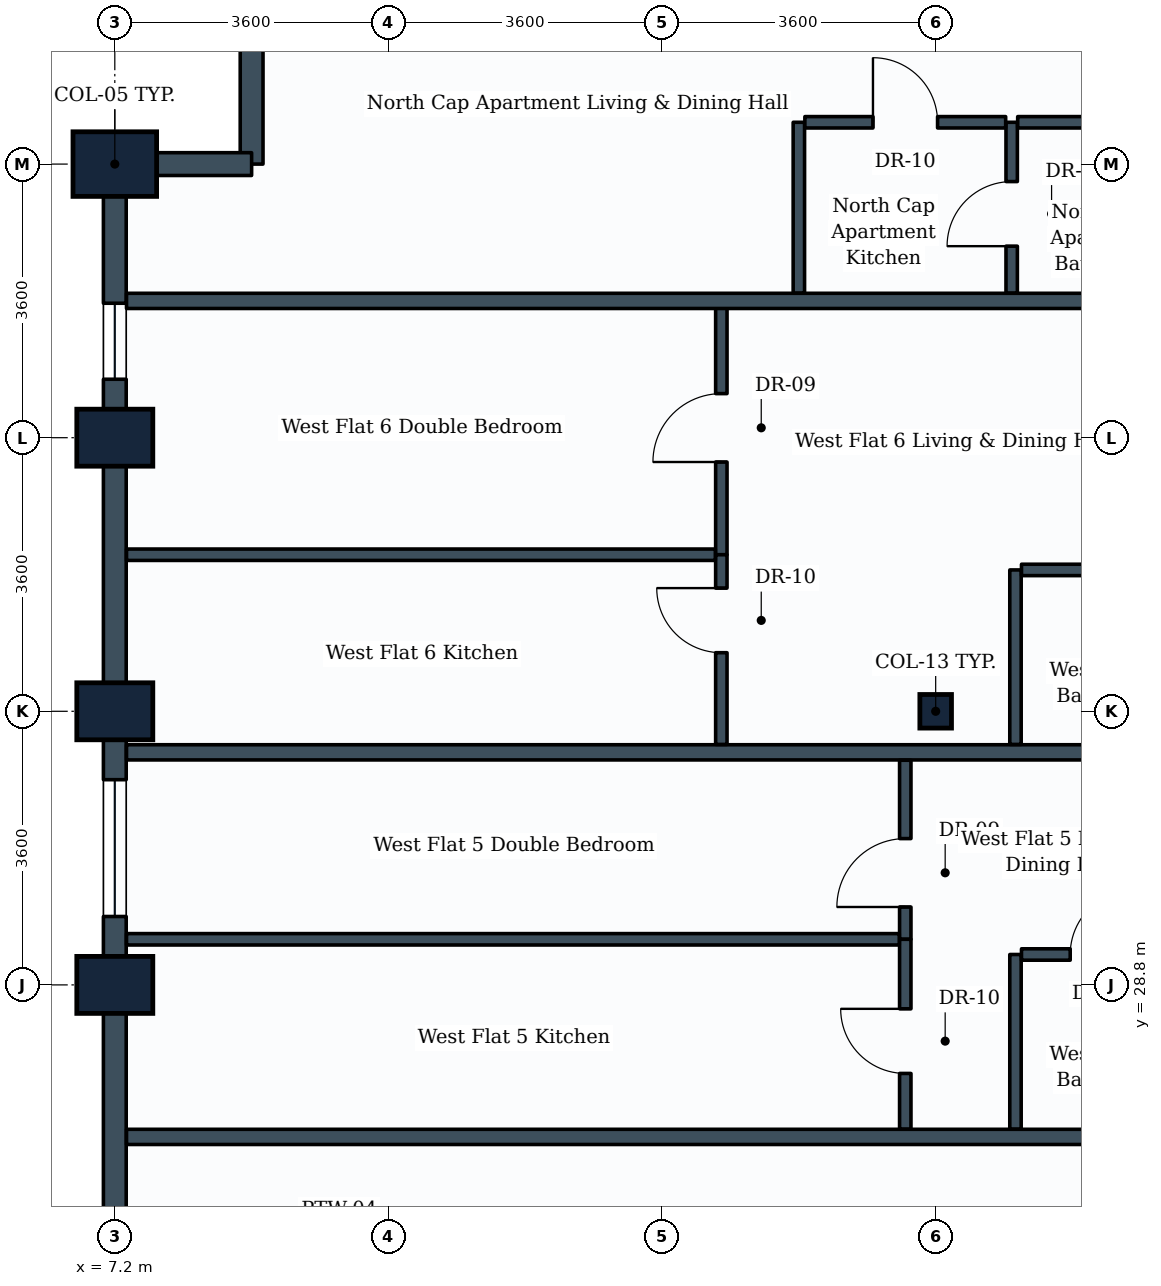
"""IFC4 building model, lengths in metres.
Left out: names, types, materials, properties, quantities, classifications, styles, units other than length and angle.
Written with IfcOpenShell. Run it as: python <this file> out.ifc"""

import sys

from ifc_helpers import new_model, si_unit, direction, frame, frame_2d, origin, origin_2d, place, context, subcontext, project, spatial, rectangle, i_section, extrude, element, fill, save


model = new_model("IFC4")
c1 = context("Model", 3, precision=1e-05, world=origin(), true_north=direction((0.0, 1.0)))
c2 = subcontext(c1, "Body", "Model", "MODEL_VIEW")
j1 = project(units=[si_unit("LENGTHUNIT", "METRE"), si_unit("PLANEANGLEUNIT", "RADIAN")], contexts=[c1])
p1 = place(None, origin())
s1 = spatial("IfcSite", under=j1, at=p1, CompositionType="ELEMENT")
p2 = place(p1, origin())
s2 = spatial("IfcBuilding", under=s1, at=p2, CompositionType="ELEMENT")
p3 = place(p2, frame((0.0, 0.0, 165.6)))
s3 = spatial("IfcBuildingStorey", under=s2, at=p3, CompositionType="ELEMENT", Elevation=165.6)
for number, where, z_axis, x_axis in (
    (1, (7.2, 28.8, 0.0), (0.0, 0.0, 1.0), (0.0, 1.0, 0.0)),
    (2, (7.2, 32.4, 0.0), (0.0, 0.0, 1.0), (0.0, 1.0, 0.0)),
    (3, (7.2, 36.0, 0.0), (0.0, 0.0, 1.0), (0.0, 1.0, 0.0)),
):
    element("IfcColumn", number, at=place(p3, frame(where, z_axis=z_axis, x_axis=x_axis)), inside=s3, PredefinedType="COLUMN", context=c2, shape_type="SweptSolid", body=[
        extrude(rectangle(XDim=0.75, YDim=1.0, at=origin_2d()), origin(), (0.0, 0.0, 1.0), 3.8),
    ])
p4 = place(p3, frame((7.2, 39.6, 0.0), z_axis=(0.0, 0.0, 1.0), x_axis=(0.0, 1.0, 0.0)))
e4 = element("IfcColumn", 4, at=p4, inside=s3, PredefinedType="COLUMN", context=c2, shape_type="SweptSolid", body=[
    extrude(rectangle(XDim=0.85, YDim=1.1, at=origin_2d()), origin(), (0.0, 0.0, 1.0), 3.8),
])
p5 = place(p3, frame((18.0, 32.4, 0.0), z_axis=(0.0, 0.0, 1.0), x_axis=(1.0, 0.0, 0.0)))
e5 = element("IfcColumn", 5, at=p5, inside=s3, PredefinedType="COLUMN", context=c2, shape_type="SweptSolid", body=[
    extrude(i_section(OverallWidth=0.416, OverallDepth=0.442, WebThickness=0.025, FlangeThickness=0.041, FilletRadius=0.015, at=origin_2d()), origin(), (0.0, 0.0, 1.0), 3.8),
])
p6 = place(p3, frame((9.0, 39.6, 0.0), z_axis=(0.0, 0.0, 1.0), x_axis=(0.0, 1.0, 0.0)))
e6 = element("IfcWall", 6, at=p6, inside=s3, PredefinedType="STANDARD", context=c2, shape_type="SweptSolid", body=[
    extrude(rectangle(XDim=1.8, YDim=0.3, at=frame_2d((0.9, 0.0))), origin(), (0.0, 0.0, 1.0), 3.465),
])
p7 = place(p3, frame((7.2, 39.6, 0.0), z_axis=(0.0, 0.0, 1.0), x_axis=(1.0, 0.0, 0.0)))
e7 = element("IfcWall", 7, at=p7, inside=s3, PredefinedType="STANDARD", context=c2, shape_type="SweptSolid", body=[
    extrude(rectangle(XDim=1.8, YDim=0.3, at=frame_2d((0.9, 0.0))), origin(), (0.0, 0.0, 1.0), 2.93),
])
p8 = place(p3, frame((7.2, 36.0, 0.0), z_axis=(0.0, 0.0, 1.0), x_axis=(0.0, 1.0, 0.0)))
e8 = element("IfcWall", 8, at=p8, inside=s3, PredefinedType="STANDARD", context=c2, shape_type="SweptSolid", body=[
    extrude(rectangle(XDim=3.6, YDim=0.3, at=frame_2d((1.8, 0.0))), origin(), (0.0, 0.0, 1.0), 2.93),
])
p9 = place(p8, frame((0.769, 0.0, 0.85)))
e9 = element("IfcOpeningElement", 9, at=p9, cuts=e8, PredefinedType="OPENING", context=c2, shape_type="SweptSolid", body=[
    extrude(rectangle(XDim=1.0, YDim=1.35, at=frame_2d((0.5, 0.675))), frame((0.0, 0.16, 0.0), z_axis=(0.0, -1.0, 0.0), x_axis=(1.0, 0.0, 0.0)), (0.0, 0.0, 1.0), 0.32),
])
p10 = place(p3, frame((7.2, 32.4, 0.0), z_axis=(0.0, 0.0, 1.0), x_axis=(0.0, 1.0, 0.0)))
e10 = element("IfcWall", 10, at=p10, inside=s3, PredefinedType="STANDARD", context=c2, shape_type="SweptSolid", body=[
    extrude(rectangle(XDim=3.6, YDim=0.3, at=frame_2d((1.8, 0.0))), origin(), (0.0, 0.0, 1.0), 2.93),
])
p11 = place(p3, frame((7.2, 28.8, 0.0), z_axis=(0.0, 0.0, 1.0), x_axis=(0.0, 1.0, 0.0)))
e11 = element("IfcWall", 11, at=p11, inside=s3, PredefinedType="STANDARD", context=c2, shape_type="SweptSolid", body=[
    extrude(rectangle(XDim=3.6, YDim=0.3, at=frame_2d((1.8, 0.0))), origin(), (0.0, 0.0, 1.0), 2.93),
])
p12 = place(p11, frame((0.9, 0.0, 0.85)))
e12 = element("IfcOpeningElement", 12, at=p12, cuts=e11, PredefinedType="OPENING", context=c2, shape_type="SweptSolid", body=[
    extrude(rectangle(XDim=1.8, YDim=1.35, at=frame_2d((0.9, 0.675))), frame((0.0, 0.16, 0.0), z_axis=(0.0, -1.0, 0.0), x_axis=(1.0, 0.0, 0.0)), (0.0, 0.0, 1.0), 0.32),
])
p13 = place(p3, frame((7.2, 25.2, 0.0), z_axis=(0.0, 0.0, 1.0), x_axis=(0.0, 1.0, 0.0)))
e13 = element("IfcWall", 13, at=p13, inside=s3, PredefinedType="STANDARD", context=c2, shape_type="SweptSolid", body=[
    extrude(rectangle(XDim=3.6, YDim=0.3, at=frame_2d((1.8, 0.0))), origin(), (0.0, 0.0, 1.0), 2.93),
])
for number, where, z_axis, x_axis in (
    (14, (7.354, 26.8, 0.0), (0.0, 0.0, 1.0), (1.0, 0.0, 0.0)),
    (15, (7.354, 31.86, 0.0), (0.0, 0.0, 1.0), (1.0, 0.0, 0.0)),
):
    element("IfcWall", number, at=place(p3, frame(where, z_axis=z_axis, x_axis=x_axis)), inside=s3, PredefinedType="PARTITIONING", context=c2, shape_type="SweptSolid", body=[
        extrude(rectangle(XDim=14.046, YDim=0.2, at=frame_2d((7.023, 0.0))), origin(), (0.0, 0.0, 1.0), 2.93),
    ])
p14 = place(p3, frame((19.05, 26.904, 0.0), z_axis=(0.0, 0.0, 1.0), x_axis=(0.0, 1.0, 0.0)))
e16 = element("IfcWall", 16, at=p14, inside=s3, PredefinedType="PARTITIONING", context=c2, shape_type="SweptSolid", body=[
    extrude(rectangle(XDim=2.296, YDim=0.15, at=frame_2d((1.148, 0.0))), origin(), (0.0, 0.0, 1.0), 3.1),
])
p15 = place(p3, frame((19.129, 29.2, 0.0), z_axis=(0.0, 0.0, 1.0), x_axis=(1.0, 0.0, 0.0)))
e17 = element("IfcWall", 17, at=p15, inside=s3, PredefinedType="PARTITIONING", context=c2, shape_type="SweptSolid", body=[
    extrude(rectangle(XDim=2.167, YDim=0.15, at=frame_2d((1.083, 0.0))), origin(), (0.0, 0.0, 1.0), 3.465),
])
p16 = place(p15, frame((0.641, 0.0, 0.0)))
e18 = element("IfcOpeningElement", 18, at=p16, cuts=e17, PredefinedType="OPENING", context=c2, shape_type="SweptSolid", body=[
    extrude(rectangle(XDim=0.85, YDim=2.1, at=frame_2d((0.425, 1.05))), frame((0.0, 0.085, 0.0), z_axis=(0.0, -1.0, 0.0), x_axis=(1.0, 0.0, 0.0)), (0.0, 0.0, 1.0), 0.17),
])
p17 = place(p3, frame((17.6, 29.4, 0.0), z_axis=(0.0, 0.0, 1.0), x_axis=(0.0, 1.0, 0.0)))
e19 = element("IfcWall", 19, at=p17, inside=s3, PredefinedType="PARTITIONING", context=c2, shape_type="SweptSolid", body=[
    extrude(rectangle(XDim=2.356, YDim=0.15, at=frame_2d((1.178, 0.0))), origin(), (0.0, 0.0, 1.0), 3.465),
])
p18 = place(p17, frame((0.425, 0.0, 0.0)))
e20 = element("IfcOpeningElement", 20, at=p18, cuts=e19, PredefinedType="OPENING", context=c2, shape_type="SweptSolid", body=[
    extrude(rectangle(XDim=0.9, YDim=2.1, at=frame_2d((0.45, 1.05))), frame((0.0, 0.085, 0.0), z_axis=(0.0, -1.0, 0.0), x_axis=(1.0, 0.0, 0.0)), (0.0, 0.0, 1.0), 0.17),
])
p19 = place(p3, frame((17.6, 26.904, 0.0), z_axis=(0.0, 0.0, 1.0), x_axis=(0.0, 1.0, 0.0)))
e21 = element("IfcWall", 21, at=p19, inside=s3, PredefinedType="PARTITIONING", context=c2, shape_type="SweptSolid", body=[
    extrude(rectangle(XDim=2.496, YDim=0.15, at=frame_2d((1.248, 0.0))), origin(), (0.0, 0.0, 1.0), 3.1),
])
p20 = place(p19, frame((0.731, 0.0, 0.0)))
e22 = element("IfcOpeningElement", 22, at=p20, cuts=e21, PredefinedType="OPENING", context=c2, shape_type="SweptSolid", body=[
    extrude(rectangle(XDim=0.85, YDim=2.1, at=frame_2d((0.425, 1.05))), frame((0.0, 0.085, 0.0), z_axis=(0.0, -1.0, 0.0), x_axis=(1.0, 0.0, 0.0)), (0.0, 0.0, 1.0), 0.17),
])
p21 = place(p3, frame((7.354, 29.4, 0.0), z_axis=(0.0, 0.0, 1.0), x_axis=(1.0, 0.0, 0.0)))
e23 = element("IfcWall", 23, at=p21, inside=s3, PredefinedType="PARTITIONING", context=c2, shape_type="SweptSolid", body=[
    extrude(rectangle(XDim=10.167, YDim=0.15, at=frame_2d((5.083, 0.0))), origin(), (0.0, 0.0, 1.0), 2.93),
])
p22 = place(p3, frame((19.05, 31.964, 0.0), z_axis=(0.0, 0.0, 1.0), x_axis=(0.0, 1.0, 0.0)))
e24 = element("IfcWall", 24, at=p22, inside=s3, PredefinedType="PARTITIONING", context=c2, shape_type="SweptSolid", body=[
    extrude(rectangle(XDim=2.296, YDim=0.15, at=frame_2d((1.148, 0.0))), origin(), (0.0, 0.0, 1.0), 3.11),
])
p23 = place(p3, frame((19.129, 34.26, 0.0), z_axis=(0.0, 0.0, 1.0), x_axis=(1.0, 0.0, 0.0)))
e25 = element("IfcWall", 25, at=p23, inside=s3, PredefinedType="PARTITIONING", context=c2, shape_type="SweptSolid", body=[
    extrude(rectangle(XDim=2.167, YDim=0.15, at=frame_2d((1.083, 0.0))), origin(), (0.0, 0.0, 1.0), 3.465),
])
p24 = place(p23, frame((1.001, 0.0, 0.0)))
e26 = element("IfcOpeningElement", 26, at=p24, cuts=e25, PredefinedType="OPENING", context=c2, shape_type="SweptSolid", body=[
    extrude(rectangle(XDim=0.85, YDim=2.1, at=frame_2d((0.425, 1.05))), frame((0.0, 0.085, 0.0), z_axis=(0.0, -1.0, 0.0), x_axis=(1.0, 0.0, 0.0)), (0.0, 0.0, 1.0), 0.17),
])
p25 = place(p3, frame((15.18, 34.46, 0.0), z_axis=(0.0, 0.0, 1.0), x_axis=(0.0, 1.0, 0.0)))
e27 = element("IfcWall", 27, at=p25, inside=s3, PredefinedType="PARTITIONING", context=c2, shape_type="SweptSolid", body=[
    extrude(rectangle(XDim=3.34, YDim=0.15, at=frame_2d((1.67, 0.0))), origin(), (0.0, 0.0, 1.0), 3.1),
])
p26 = place(p25, frame((1.22, 0.0, 0.0)))
e28 = element("IfcOpeningElement", 28, at=p26, cuts=e27, PredefinedType="OPENING", context=c2, shape_type="SweptSolid", body=[
    extrude(rectangle(XDim=0.9, YDim=2.1, at=frame_2d((0.45, 1.05))), frame((0.0, 0.085, 0.0), z_axis=(0.0, -1.0, 0.0), x_axis=(1.0, 0.0, 0.0)), (0.0, 0.0, 1.0), 0.17),
])
p27 = place(p3, frame((15.18, 31.964, 0.0), z_axis=(0.0, 0.0, 1.0), x_axis=(0.0, 1.0, 0.0)))
e29 = element("IfcWall", 29, at=p27, inside=s3, PredefinedType="PARTITIONING", context=c2, shape_type="SweptSolid", body=[
    extrude(rectangle(XDim=2.496, YDim=0.15, at=frame_2d((1.248, 0.0))), origin(), (0.0, 0.0, 1.0), 3.11),
])
p28 = place(p27, frame((1.207, 0.0, 0.0)))
e30 = element("IfcOpeningElement", 30, at=p28, cuts=e29, PredefinedType="OPENING", context=c2, shape_type="SweptSolid", body=[
    extrude(rectangle(XDim=0.85, YDim=2.1, at=frame_2d((0.425, 1.05))), frame((0.0, 0.085, 0.0), z_axis=(0.0, -1.0, 0.0), x_axis=(1.0, 0.0, 0.0)), (0.0, 0.0, 1.0), 0.17),
])
p29 = place(p3, frame((7.354, 34.46, 0.0), z_axis=(0.0, 0.0, 1.0), x_axis=(1.0, 0.0, 0.0)))
e31 = element("IfcWall", 31, at=p29, inside=s3, PredefinedType="PARTITIONING", context=c2, shape_type="SweptSolid", body=[
    extrude(rectangle(XDim=7.747, YDim=0.15, at=frame_2d((3.874, 0.0))), origin(), (0.0, 0.0, 1.0), 2.93),
])
p30 = place(p3, frame((7.354, 37.8, 0.0), z_axis=(0.0, 0.0, 1.0), x_axis=(1.0, 0.0, 0.0)))
e32 = element("IfcWall", 32, at=p30, inside=s3, PredefinedType="PARTITIONING", context=c2, shape_type="SweptSolid", body=[
    extrude(rectangle(XDim=13.942, YDim=0.2, at=frame_2d((6.971, 0.0))), origin(), (0.0, 0.0, 1.0), 2.93),
])
p31 = place(p3, frame((19.0, 37.904, 0.0), z_axis=(0.0, 0.0, 1.0), x_axis=(0.0, 1.0, 0.0)))
e33 = element("IfcWall", 33, at=p31, inside=s3, PredefinedType="PARTITIONING", context=c2, shape_type="SweptSolid", body=[
    extrude(rectangle(XDim=2.246, YDim=0.15, at=frame_2d((1.123, 0.0))), origin(), (0.0, 0.0, 1.0), 3.465),
])
p32 = place(p31, frame((0.616, 0.0, 0.0)))
e34 = element("IfcOpeningElement", 34, at=p32, cuts=e33, PredefinedType="OPENING", context=c2, shape_type="SweptSolid", body=[
    extrude(rectangle(XDim=0.85, YDim=2.1, at=frame_2d((0.425, 1.05))), frame((0.0, 0.085, 0.0), z_axis=(0.0, -1.0, 0.0), x_axis=(1.0, 0.0, 0.0)), (0.0, 0.0, 1.0), 0.17),
])
p33 = place(p3, frame((19.079, 40.15, 0.0), z_axis=(0.0, 0.0, 1.0), x_axis=(1.0, 0.0, 0.0)))
e35 = element("IfcWall", 35, at=p33, inside=s3, PredefinedType="PARTITIONING", context=c2, shape_type="SweptSolid", body=[
    extrude(rectangle(XDim=2.242, YDim=0.15, at=frame_2d((1.121, 0.0))), origin(), (0.0, 0.0, 1.0), 3.465),
])
p34 = place(p3, frame((16.2, 37.904, 0.0), z_axis=(0.0, 0.0, 1.0), x_axis=(0.0, 1.0, 0.0)))
e36 = element("IfcWall", 36, at=p34, inside=s3, PredefinedType="PARTITIONING", context=c2, shape_type="SweptSolid", body=[
    extrude(rectangle(XDim=2.246, YDim=0.15, at=frame_2d((1.123, 0.0))), origin(), (0.0, 0.0, 1.0), 3.465),
])
p35 = place(p3, frame((16.279, 40.15, 0.0), z_axis=(0.0, 0.0, 1.0), x_axis=(1.0, 0.0, 0.0)))
e37 = element("IfcWall", 37, at=p35, inside=s3, PredefinedType="PARTITIONING", context=c2, shape_type="SweptSolid", body=[
    extrude(rectangle(XDim=2.642, YDim=0.15, at=frame_2d((1.321, 0.0))), origin(), (0.0, 0.0, 1.0), 3.1),
])
p36 = place(p35, frame((0.896, 0.0, 0.0)))
e38 = element("IfcOpeningElement", 38, at=p36, cuts=e37, PredefinedType="OPENING", context=c2, shape_type="SweptSolid", body=[
    extrude(rectangle(XDim=0.85, YDim=2.1, at=frame_2d((0.425, 1.05))), frame((0.0, 0.085, 0.0), z_axis=(0.0, -1.0, 0.0), x_axis=(1.0, 0.0, 0.0)), (0.0, 0.0, 1.0), 0.17),
])
p37 = place(p12, origin())
e39 = element("IfcWindow", 39, at=p37, inside=s3, PartitioningType="SINGLE_PANEL", PredefinedType="WINDOW", context=c2, shape_type="SweptSolid", body=[
    extrude(rectangle(XDim=1.8, YDim=1.35, at=frame_2d((0.9, 0.675))), frame((0.0, 0.03, 0.0), z_axis=(0.0, -1.0, 0.0), x_axis=(1.0, 0.0, 0.0)), (0.0, 0.0, 1.0), 0.06),
])
fill(e12, e39)
p38 = place(p16, origin())
e40 = element("IfcDoor", 40, at=p38, inside=s3, OperationType="SINGLE_SWING_RIGHT", PredefinedType="DOOR", context=c2, shape_type="SweptSolid", body=[
    extrude(rectangle(XDim=0.85, YDim=2.1, at=frame_2d((0.425, 1.05))), frame((0.0, 0.025, 0.0), z_axis=(0.0, -1.0, 0.0), x_axis=(1.0, 0.0, 0.0)), (0.0, 0.0, 1.0), 0.05),
])
fill(e18, e40)
p39 = place(p18, origin())
e41 = element("IfcDoor", 41, at=p39, inside=s3, OperationType="SINGLE_SWING_LEFT", PredefinedType="DOOR", context=c2, shape_type="SweptSolid", body=[
    extrude(rectangle(XDim=0.9, YDim=2.1, at=frame_2d((0.45, 1.05))), frame((0.0, 0.025, 0.0), z_axis=(0.0, -1.0, 0.0), x_axis=(1.0, 0.0, 0.0)), (0.0, 0.0, 1.0), 0.05),
])
fill(e20, e41)
p40 = place(p20, origin())
e42 = element("IfcDoor", 42, at=p40, inside=s3, OperationType="SINGLE_SWING_RIGHT", PredefinedType="DOOR", context=c2, shape_type="SweptSolid", body=[
    extrude(rectangle(XDim=0.85, YDim=2.1, at=frame_2d((0.425, 1.05))), frame((0.0, 0.025, 0.0), z_axis=(0.0, -1.0, 0.0), x_axis=(1.0, 0.0, 0.0)), (0.0, 0.0, 1.0), 0.05),
])
fill(e22, e42)
p41 = place(p26, origin())
e43 = element("IfcDoor", 43, at=p41, inside=s3, OperationType="SINGLE_SWING_LEFT", PredefinedType="DOOR", context=c2, shape_type="SweptSolid", body=[
    extrude(rectangle(XDim=0.9, YDim=2.1, at=frame_2d((0.45, 1.05))), frame((0.0, 0.025, 0.0), z_axis=(0.0, -1.0, 0.0), x_axis=(1.0, 0.0, 0.0)), (0.0, 0.0, 1.0), 0.05),
])
fill(e28, e43)
p42 = place(p28, origin())
e44 = element("IfcDoor", 44, at=p42, inside=s3, OperationType="SINGLE_SWING_RIGHT", PredefinedType="DOOR", context=c2, shape_type="SweptSolid", body=[
    extrude(rectangle(XDim=0.85, YDim=2.1, at=frame_2d((0.425, 1.05))), frame((0.0, 0.025, 0.0), z_axis=(0.0, -1.0, 0.0), x_axis=(1.0, 0.0, 0.0)), (0.0, 0.0, 1.0), 0.05),
])
fill(e30, e44)
p43 = place(p32, origin())
e45 = element("IfcDoor", 45, at=p43, inside=s3, OperationType="SINGLE_SWING_LEFT", PredefinedType="DOOR", context=c2, shape_type="SweptSolid", body=[
    extrude(rectangle(XDim=0.85, YDim=2.1, at=frame_2d((0.425, 1.05))), frame((0.0, 0.025, 0.0), z_axis=(0.0, -1.0, 0.0), x_axis=(1.0, 0.0, 0.0)), (0.0, 0.0, 1.0), 0.05),
])
fill(e34, e45)
p44 = place(p36, origin())
e46 = element("IfcDoor", 46, at=p44, inside=s3, OperationType="SINGLE_SWING_LEFT", PredefinedType="DOOR", context=c2, shape_type="SweptSolid", body=[
    extrude(rectangle(XDim=0.85, YDim=2.1, at=frame_2d((0.425, 1.05))), frame((0.0, 0.025, 0.0), z_axis=(0.0, -1.0, 0.0), x_axis=(1.0, 0.0, 0.0)), (0.0, 0.0, 1.0), 0.05),
])
fill(e38, e46)
p45 = place(p9, origin())
e47 = element("IfcWindow", 47, at=p45, inside=s3, PartitioningType="SINGLE_PANEL", PredefinedType="WINDOW", context=c2, shape_type="SweptSolid", body=[
    extrude(rectangle(XDim=1.0, YDim=1.35, at=frame_2d((0.5, 0.675))), frame((0.0, 0.03, 0.0), z_axis=(0.0, -1.0, 0.0), x_axis=(1.0, 0.0, 0.0)), (0.0, 0.0, 1.0), 0.06),
])
fill(e9, e47)
save(model, sys.argv[1])
